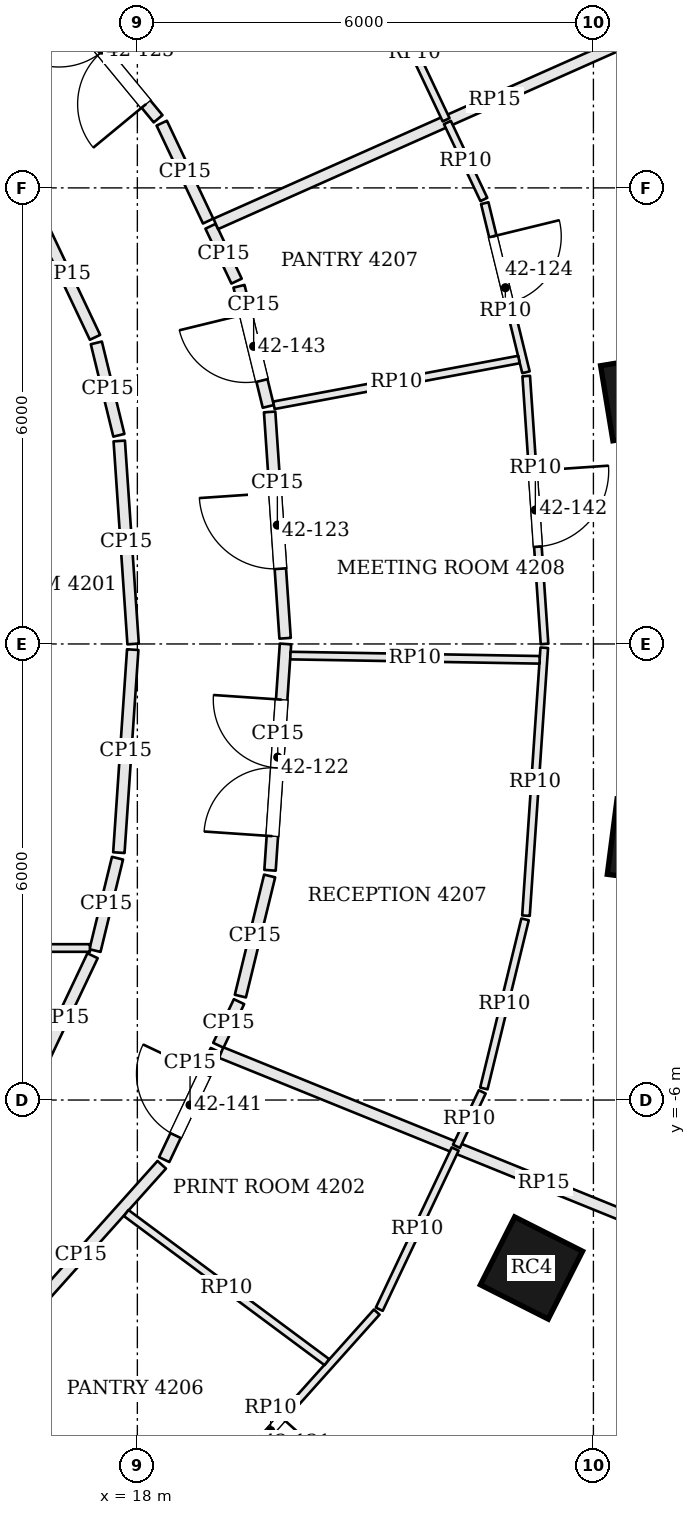
"""IFC4 building model, lengths in metres.
Left out: names, types, materials, properties, quantities, classifications, styles, units other than length and angle.
Written with IfcOpenShell. Run it as: python <this file> out.ifc"""

import sys

from ifc_helpers import new_model, si_unit, direction, frame, frame_2d, origin, origin_2d, place, context, subcontext, project, spatial, rectangle, extrude, element, fill, save


model = new_model("IFC4")
c1 = context("Model", 3, precision=1e-05, world=origin(), true_north=direction((0.0, 1.0)))
c2 = subcontext(c1, "Body", "Model", "MODEL_VIEW")
j1 = project(units=[si_unit("LENGTHUNIT", "METRE"), si_unit("PLANEANGLEUNIT", "RADIAN")], contexts=[c1])
p1 = place(None, origin())
s1 = spatial("IfcSite", under=j1, at=p1, CompositionType="ELEMENT")
p2 = place(p1, origin())
s2 = spatial("IfcBuilding", under=s1, at=p2, CompositionType="ELEMENT")
p3 = place(p2, frame((0.0, 0.0, 174.0)))
s3 = spatial("IfcBuildingStorey", under=s2, at=p3, CompositionType="ELEMENT", Elevation=174.0)
for number, where, z_axis, x_axis in (
    (1, (24.669, 3.248, -0.7), (0.0, 0.0, 1.0), (-0.162, 0.987, 0.0)),
    (2, (23.185, -8.21, -0.7), (0.0, 0.0, 1.0), (0.451, 0.893, 0.0)),
    (3, (24.743, -2.599, -0.7), (0.0, 0.0, 1.0), (0.128, 0.992, 0.0)),
):
    element("IfcColumn", number, at=place(p3, frame(where, z_axis=z_axis, x_axis=x_axis)), inside=s3, PredefinedType="COLUMN", context=c2, shape_type="SweptSolid", body=[
        extrude(rectangle(XDim=1.0, YDim=1.0, at=origin_2d()), origin(), (0.0, 0.0, 1.0), 4.6),
    ])
p4 = place(p3, frame((23.368, -11.701, 0.0), z_axis=(0.0, 0.0, 1.0), x_axis=(0.850251408633, 0.526376806211, 0.0)))
e4 = element("IfcWall", 4, at=p4, inside=s3, PredefinedType="SOLIDWALL", context=c2, shape_type="SweptSolid", body=[
    extrude(rectangle(XDim=5.302, YDim=0.45, at=frame_2d((2.651, 0.0))), origin(), (0.0, 0.0, 1.0), 3.7),
])
p5 = place(p4, frame((1.601, 0.0, 0.9)))
e5 = element("IfcOpeningElement", 5, at=p5, cuts=e4, PredefinedType="OPENING", context=c2, shape_type="SweptSolid", body=[
    extrude(rectangle(XDim=2.1, YDim=2.3, at=frame_2d((1.05, 1.15))), frame((0.0, 0.235, 0.0), z_axis=(0.0, -1.0, 0.0), x_axis=(1.0, 0.0, 0.0)), (0.0, 0.0, 1.0), 0.47),
])
p6 = place(p3, frame((16.193, -9.229, 0.0), z_axis=(0.0, 0.0, 1.0), x_axis=(0.666882089048, 0.745163256815, 0.0)))
e6 = element("IfcWall", 6, at=p6, inside=s3, PredefinedType="PARTITIONING", context=c2, shape_type="SweptSolid", body=[
    extrude(rectangle(XDim=3.19, YDim=0.15, at=frame_2d((1.595, 0.0))), origin(), (0.0, 0.0, 1.0), 3.084),
])
p7 = place(p3, frame((18.353, -6.784, 0.0), z_axis=(0.0, 0.0, 1.0), x_axis=(0.428125964575, 0.90371907054, 0.0)))
e7 = element("IfcWall", 7, at=p7, inside=s3, PredefinedType="PARTITIONING", context=c2, shape_type="SweptSolid", body=[
    extrude(rectangle(XDim=1.589, YDim=0.15, at=frame_2d((0.795, 0.0))), origin(), (0.0, 0.0, 1.0), 3.084),
])
p8 = place(p7, frame((0.35, 0.0, 0.0)))
e8 = element("IfcOpeningElement", 8, at=p8, cuts=e7, PredefinedType="OPENING", context=c2, shape_type="SweptSolid", body=[
    extrude(rectangle(XDim=0.9, YDim=2.1, at=frame_2d((0.45, 1.05))), frame((0.0, 0.085, 0.0), z_axis=(0.0, -1.0, 0.0), x_axis=(1.0, 0.0, 0.0)), (0.0, 0.0, 1.0), 0.17),
])
p9 = place(p3, frame((27.593, -8.816, 0.0), z_axis=(0.0, 0.0, 1.0), x_axis=(-0.9267854071, 0.375591279433, 0.0)))
e9 = element("IfcWall", 9, at=p9, inside=s3, PredefinedType="PARTITIONING", context=c2, shape_type="SweptSolid", body=[
    extrude(rectangle(XDim=9.161, YDim=0.15, at=frame_2d((4.58, 0.0))), origin(), (0.0, 0.0, 1.0), 3.234),
])
p10 = place(p3, frame((19.065, -5.28, 0.0), z_axis=(0.0, 0.0, 1.0), x_axis=(0.428202003813, 0.903683043954, 0.0)))
e10 = element("IfcWall", 10, at=p10, inside=s3, PredefinedType="PARTITIONING", context=c2, shape_type="SweptSolid", body=[
    extrude(rectangle(XDim=0.635, YDim=0.15, at=frame_2d((0.318, 0.0))), origin(), (0.0, 0.0, 1.0), 3.084),
])
p11 = place(p3, frame((19.355, -4.633, 0.0), z_axis=(0.0, 0.0, 1.0), x_axis=(0.236703930685, 0.971581828359, 0.0)))
e11 = element("IfcWall", 11, at=p11, inside=s3, PredefinedType="PARTITIONING", context=c2, shape_type="SweptSolid", body=[
    extrude(rectangle(XDim=1.626, YDim=0.15, at=frame_2d((0.813, 0.0))), origin(), (0.0, 0.0, 1.0), 3.084),
])
p12 = place(p3, frame((19.745, -2.978, 0.0), z_axis=(0.0, 0.0, 1.0), x_axis=(0.068142324, 0.997675610447, 0.0)))
e12 = element("IfcWall", 12, at=p12, inside=s3, PredefinedType="PARTITIONING", context=c2, shape_type="SweptSolid", body=[
    extrude(rectangle(XDim=2.984, YDim=0.15, at=frame_2d((1.492, 0.0))), origin(), (0.0, 0.0, 1.0), 3.084),
])
p13 = place(p12, frame((0.45, 0.0, 0.0)))
e13 = element("IfcOpeningElement", 13, at=p13, cuts=e12, PredefinedType="OPENING", context=c2, shape_type="SweptSolid", body=[
    extrude(rectangle(XDim=1.8, YDim=2.1, at=frame_2d((0.9, 1.05))), frame((0.0, 0.085, 0.0), z_axis=(0.0, -1.0, 0.0), x_axis=(1.0, 0.0, 0.0)), (0.0, 0.0, 1.0), 0.17),
])
p14 = place(p3, frame((19.944, 0.075, 0.0), z_axis=(0.0, 0.0, 1.0), x_axis=(-0.068136763128, 0.997675990245, 0.0)))
e14 = element("IfcWall", 14, at=p14, inside=s3, PredefinedType="PARTITIONING", context=c2, shape_type="SweptSolid", body=[
    extrude(rectangle(XDim=2.985, YDim=0.15, at=frame_2d((1.492, 0.0))), origin(), (0.0, 0.0, 1.0), 3.084),
])
p15 = place(p14, frame((0.917, 0.0, 0.0)))
e15 = element("IfcOpeningElement", 15, at=p15, cuts=e14, PredefinedType="OPENING", context=c2, shape_type="SweptSolid", body=[
    extrude(rectangle(XDim=1.0, YDim=2.4, at=frame_2d((0.5, 1.2))), frame((0.0, 0.085, 0.0), z_axis=(0.0, -1.0, 0.0), x_axis=(1.0, 0.0, 0.0)), (0.0, 0.0, 1.0), 0.17),
])
p16 = place(p3, frame((19.722, 3.125, 0.0), z_axis=(0.0, 0.0, 1.0), x_axis=(-0.236703930685, 0.971581828359, 0.0)))
e16 = element("IfcWall", 16, at=p16, inside=s3, PredefinedType="PARTITIONING", context=c2, shape_type="SweptSolid", body=[
    extrude(rectangle(XDim=1.626, YDim=0.15, at=frame_2d((0.813, 0.0))), origin(), (0.0, 0.0, 1.0), 3.084),
])
p17 = place(p16, frame((0.35, 0.0, 0.0)))
e17 = element("IfcOpeningElement", 17, at=p17, cuts=e16, PredefinedType="OPENING", context=c2, shape_type="SweptSolid", body=[
    extrude(rectangle(XDim=0.9, YDim=2.1, at=frame_2d((0.45, 1.05))), frame((0.0, 0.085, 0.0), z_axis=(0.0, -1.0, 0.0), x_axis=(1.0, 0.0, 0.0)), (0.0, 0.0, 1.0), 0.17),
])
p18 = place(p3, frame((19.305, 4.773, 0.0), z_axis=(0.0, 0.0, 1.0), x_axis=(-0.428296443676, 0.90363828844, 0.0)))
e18 = element("IfcWall", 18, at=p18, inside=s3, PredefinedType="PARTITIONING", context=c2, shape_type="SweptSolid", body=[
    extrude(rectangle(XDim=0.799, YDim=0.15, at=frame_2d((0.399, 0.0))), origin(), (0.0, 0.0, 1.0), 3.084),
])
p19 = place(p3, frame((26.367, 8.789, 0.0), z_axis=(0.0, 0.0, 1.0), x_axis=(-0.913673557468, -0.406448804137, 0.0)))
e19 = element("IfcWall", 19, at=p19, inside=s3, PredefinedType="PARTITIONING", context=c2, shape_type="SweptSolid", body=[
    extrude(rectangle(XDim=8.029, YDim=0.15, at=frame_2d((4.014, 0.0))), origin(), (0.0, 0.0, 1.0), 3.234),
])
p20 = place(p3, frame((18.931, 5.563, 0.0), z_axis=(0.0, 0.0, 1.0), x_axis=(-0.428204145682, 0.903682029046, 0.0)))
e20 = element("IfcWall", 20, at=p20, inside=s3, PredefinedType="PARTITIONING", context=c2, shape_type="SweptSolid", body=[
    extrude(rectangle(XDim=1.425, YDim=0.15, at=frame_2d((0.713, 0.0))), origin(), (0.0, 0.0, 1.0), 3.084),
])
p21 = place(p3, frame((18.273, 6.909, 0.0), z_axis=(0.0, 0.0, 1.0), x_axis=(-0.63653648943, 0.771246586783, 0.0)))
e21 = element("IfcWall", 21, at=p21, inside=s3, PredefinedType="PARTITIONING", context=c2, shape_type="SweptSolid", body=[
    extrude(rectangle(XDim=2.342, YDim=0.15, at=frame_2d((1.171, 0.0))), origin(), (0.0, 0.0, 1.0), 3.084),
])
p22 = place(p21, frame((0.25, 0.0, 0.0)))
e22 = element("IfcOpeningElement", 22, at=p22, cuts=e21, PredefinedType="OPENING", context=c2, shape_type="SweptSolid", body=[
    extrude(rectangle(XDim=1.8, YDim=2.1, at=frame_2d((0.9, 1.05))), frame((0.0, 0.085, 0.0), z_axis=(0.0, -1.0, 0.0), x_axis=(1.0, 0.0, 0.0)), (0.0, 0.0, 1.0), 0.17),
])
p23 = place(p3, frame((16.652, 5.702, 0.0), z_axis=(0.0, 0.0, 1.0), x_axis=(0.428126129773, -0.903718992279, 0.0)))
e23 = element("IfcWall", 23, at=p23, inside=s3, PredefinedType="PARTITIONING", context=c2, shape_type="SweptSolid", body=[
    extrude(rectangle(XDim=1.846, YDim=0.15, at=frame_2d((0.923, 0.0))), origin(), (0.0, 0.0, 1.0), 3.084),
])
p24 = place(p3, frame((17.46, 3.961, 0.0), z_axis=(0.0, 0.0, 1.0), x_axis=(0.236655249498, -0.971593687137, 0.0)))
e24 = element("IfcWall", 24, at=p24, inside=s3, PredefinedType="PARTITIONING", context=c2, shape_type="SweptSolid", body=[
    extrude(rectangle(XDim=1.251, YDim=0.15, at=frame_2d((0.626, 0.0))), origin(), (0.0, 0.0, 1.0), 3.084),
])
p25 = place(p3, frame((17.762, 2.67, 0.0), z_axis=(0.0, 0.0, 1.0), x_axis=(0.068135311644, -0.997676089373, 0.0)))
e25 = element("IfcWall", 25, at=p25, inside=s3, PredefinedType="PARTITIONING", context=c2, shape_type="SweptSolid", body=[
    extrude(rectangle(XDim=2.677, YDim=0.15, at=frame_2d((1.338, 0.0))), origin(), (0.0, 0.0, 1.0), 3.084),
])
p26 = place(p3, frame((17.939, -0.075, 0.0), z_axis=(0.0, 0.0, 1.0), x_axis=(-0.068226099283, -0.99766988497, 0.0)))
e26 = element("IfcWall", 26, at=p26, inside=s3, PredefinedType="PARTITIONING", context=c2, shape_type="SweptSolid", body=[
    extrude(rectangle(XDim=2.677, YDim=0.15, at=frame_2d((1.338, 0.0))), origin(), (0.0, 0.0, 1.0), 3.084),
])
p27 = place(p3, frame((17.739, -2.818, 0.0), z_axis=(0.0, 0.0, 1.0), x_axis=(-0.236884307907, -0.971537865792, 0.0)))
e27 = element("IfcWall", 27, at=p27, inside=s3, PredefinedType="PARTITIONING", context=c2, shape_type="SweptSolid", body=[
    extrude(rectangle(XDim=1.251, YDim=0.15, at=frame_2d((0.625, 0.0))), origin(), (0.0, 0.0, 1.0), 3.084),
])
p28 = place(p3, frame((17.41, -4.102, 0.0), z_axis=(0.0, 0.0, 1.0), x_axis=(-0.428074720318, -0.903743345107, 0.0)))
e28 = element("IfcWall", 28, at=p28, inside=s3, PredefinedType="PARTITIONING", context=c2, shape_type="SweptSolid", body=[
    extrude(rectangle(XDim=1.806, YDim=0.15, at=frame_2d((0.903, 0.0))), origin(), (0.0, 0.0, 1.0), 3.084),
])
p29 = place(p3, frame((22.181, -6.645, 0.0), z_axis=(0.0, 0.0, 1.0), x_axis=(-0.428144841987, -0.903710127353, 0.0)))
e29 = element("IfcWall", 29, at=p29, inside=s3, PredefinedType="PARTITIONING", context=c2, shape_type="SweptSolid", body=[
    extrude(rectangle(XDim=2.332, YDim=0.1, at=frame_2d((1.166, 0.0))), origin(), (0.0, 0.0, 1.0), 3.084),
])
p30 = place(p3, frame((21.149, -8.789, 0.0), z_axis=(0.0, 0.0, 1.0), x_axis=(-0.666915902537, -0.745132994132, 0.0)))
e30 = element("IfcWall", 30, at=p30, inside=s3, PredefinedType="PARTITIONING", context=c2, shape_type="SweptSolid", body=[
    extrude(rectangle(XDim=4.186, YDim=0.1, at=frame_2d((2.093, 0.0))), origin(), (0.0, 0.0, 1.0), 3.084),
])
p31 = place(p30, frame((1.869, 0.0, 0.0)))
e31 = element("IfcOpeningElement", 31, at=p31, cuts=e30, PredefinedType="OPENING", context=c2, shape_type="SweptSolid", body=[
    extrude(rectangle(XDim=0.9, YDim=2.1, at=frame_2d((0.45, 1.05))), frame((0.0, 0.06, 0.0), z_axis=(0.0, -1.0, 0.0), x_axis=(1.0, 0.0, 0.0)), (0.0, 0.0, 1.0), 0.12),
])
p32 = place(p3, frame((17.853, -7.487, 0.0), z_axis=(0.0, 0.0, 1.0), x_axis=(0.802681916891, -0.596407361034, 0.0)))
e32 = element("IfcWall", 32, at=p32, inside=s3, PredefinedType="PARTITIONING", context=c2, shape_type="SweptSolid", body=[
    extrude(rectangle(XDim=3.289, YDim=0.1, at=frame_2d((1.645, 0.0))), origin(), (0.0, 0.0, 1.0), 3.084),
])
p33 = place(p3, frame((22.079, 6.86, 0.0), z_axis=(0.0, 0.0, 1.0), x_axis=(0.428105084675, -0.903728961844, 0.0)))
e33 = element("IfcWall", 33, at=p33, inside=s3, PredefinedType="PARTITIONING", context=c2, shape_type="SweptSolid", body=[
    extrude(rectangle(XDim=1.12, YDim=0.1, at=frame_2d((0.56, 0.0))), origin(), (0.0, 0.0, 1.0), 3.084),
])
p34 = place(p3, frame((22.57, 5.799, 0.0), z_axis=(0.0, 0.0, 1.0), x_axis=(0.236811358433, -0.971555649727, 0.0)))
e34 = element("IfcWall", 34, at=p34, inside=s3, PredefinedType="PARTITIONING", context=c2, shape_type="SweptSolid", body=[
    extrude(rectangle(XDim=2.29, YDim=0.1, at=frame_2d((1.145, 0.0))), origin(), (0.0, 0.0, 1.0), 3.084),
])
p35 = place(p34, frame((0.45, 0.0, 0.0)))
e35 = element("IfcOpeningElement", 35, at=p35, cuts=e34, PredefinedType="OPENING", context=c2, shape_type="SweptSolid", body=[
    extrude(rectangle(XDim=0.9, YDim=2.1, at=frame_2d((0.45, 1.05))), frame((0.0, 0.06, 0.0), z_axis=(0.0, -1.0, 0.0), x_axis=(1.0, 0.0, 0.0)), (0.0, 0.0, 1.0), 0.12),
])
p36 = place(p3, frame((23.116, 3.525, 0.0), z_axis=(0.0, 0.0, 1.0), x_axis=(0.068138009452, -0.997675905125, 0.0)))
e36 = element("IfcWall", 36, at=p36, inside=s3, PredefinedType="PARTITIONING", context=c2, shape_type="SweptSolid", body=[
    extrude(rectangle(XDim=3.533, YDim=0.1, at=frame_2d((1.767, 0.0))), origin(), (0.0, 0.0, 1.0), 3.084),
])
p37 = place(p36, frame((1.25, 0.0, 0.0)))
e37 = element("IfcOpeningElement", 37, at=p37, cuts=e36, PredefinedType="OPENING", context=c2, shape_type="SweptSolid", body=[
    extrude(rectangle(XDim=1.0, YDim=2.4, at=frame_2d((0.5, 1.2))), frame((0.0, 0.06, 0.0), z_axis=(0.0, -1.0, 0.0), x_axis=(1.0, 0.0, 0.0)), (0.0, 0.0, 1.0), 0.12),
])
p38 = place(p3, frame((23.354, -0.05, 0.0), z_axis=(0.0, 0.0, 1.0), x_axis=(-0.06820679361, -0.99767120501, 0.0)))
e38 = element("IfcWall", 38, at=p38, inside=s3, PredefinedType="PARTITIONING", context=c2, shape_type="SweptSolid", body=[
    extrude(rectangle(XDim=3.533, YDim=0.1, at=frame_2d((1.767, 0.0))), origin(), (0.0, 0.0, 1.0), 3.084),
])
p39 = place(p3, frame((23.101, -3.623, 0.0), z_axis=(0.0, 0.0, 1.0), x_axis=(-0.236811358433, -0.971555649727, 0.0)))
e39 = element("IfcWall", 39, at=p39, inside=s3, PredefinedType="PARTITIONING", context=c2, shape_type="SweptSolid", body=[
    extrude(rectangle(XDim=2.29, YDim=0.1, at=frame_2d((1.145, 0.0))), origin(), (0.0, 0.0, 1.0), 3.084),
])
p40 = place(p3, frame((22.537, -5.893, 0.0), z_axis=(0.0, 0.0, 1.0), x_axis=(-0.427993557618, -0.903781784856, 0.0)))
e40 = element("IfcWall", 40, at=p40, inside=s3, PredefinedType="PARTITIONING", context=c2, shape_type="SweptSolid", body=[
    extrude(rectangle(XDim=0.792, YDim=0.1, at=frame_2d((0.396, 0.0))), origin(), (0.0, 0.0, 1.0), 3.084),
])
p41 = place(p3, frame((20.013, -0.153, 0.0), z_axis=(0.0, 0.0, 1.0), x_axis=(0.999854678593, -0.017047630214, 0.0)))
e41 = element("IfcWall", 41, at=p41, inside=s3, PredefinedType="PARTITIONING", context=c2, shape_type="SweptSolid", body=[
    extrude(rectangle(XDim=3.28, YDim=0.1, at=frame_2d((1.64, 0.0))), origin(), (0.0, 0.0, 1.0), 3.084),
])
p42 = place(p3, frame((19.796, 3.14, 0.0), z_axis=(0.0, 0.0, 1.0), x_axis=(0.983010938824, 0.183546980778, 0.0)))
e42 = element("IfcWall", 42, at=p42, inside=s3, PredefinedType="PARTITIONING", context=c2, shape_type="SweptSolid", body=[
    extrude(rectangle(XDim=3.28, YDim=0.1, at=frame_2d((1.64, 0.0))), origin(), (0.0, 0.0, 1.0), 3.084),
])
p43 = place(p3, frame((21.234, 8.644, 0.0), z_axis=(0.0, 0.0, 1.0), x_axis=(0.428183987328, -0.903691580682, 0.0)))
e43 = element("IfcWall", 43, at=p43, inside=s3, PredefinedType="PARTITIONING", context=c2, shape_type="SweptSolid", body=[
    extrude(rectangle(XDim=1.935, YDim=0.1, at=frame_2d((0.967, 0.0))), origin(), (0.0, 0.0, 1.0), 3.084),
])
p44 = place(p3, frame((15.075, -4.0, 0.0), z_axis=(0.0, 0.0, 1.0), x_axis=(1.0, 0.0, 0.0)))
e44 = element("IfcWall", 44, at=p44, inside=s3, PredefinedType="PARTITIONING", context=c2, shape_type="SweptSolid", body=[
    extrude(rectangle(XDim=2.301, YDim=0.1, at=frame_2d((1.15, 0.0))), origin(), (0.0, 0.0, 1.0), 3.084),
])
p45 = place(p31, origin())
e45 = element("IfcDoor", 45, at=p45, inside=s3, OperationType="SINGLE_SWING_LEFT", PredefinedType="DOOR", context=c2, shape_type="SweptSolid", body=[
    extrude(rectangle(XDim=0.9, YDim=2.1, at=frame_2d((0.45, 1.05))), frame((0.0, 0.025, 0.0), z_axis=(0.0, -1.0, 0.0), x_axis=(1.0, 0.0, 0.0)), (0.0, 0.0, 1.0), 0.05),
])
fill(e31, e45)
p46 = place(p13, origin())
e46 = element("IfcDoor", 46, at=p46, inside=s3, OperationType="DOUBLE_DOOR_SINGLE_SWING", PredefinedType="DOOR", context=c2, shape_type="SweptSolid", body=[
    extrude(rectangle(XDim=1.8, YDim=2.1, at=frame_2d((0.9, 1.05))), frame((0.0, 0.025, 0.0), z_axis=(0.0, -1.0, 0.0), x_axis=(1.0, 0.0, 0.0)), (0.0, 0.0, 1.0), 0.05),
])
fill(e13, e46)
p47 = place(p15, origin())
e47 = element("IfcDoor", 47, at=p47, inside=s3, OperationType="SINGLE_SWING_RIGHT", PredefinedType="DOOR", context=c2, shape_type="SweptSolid", body=[
    extrude(rectangle(XDim=1.0, YDim=2.4, at=frame_2d((0.5, 1.2))), frame((0.0, 0.025, 0.0), z_axis=(0.0, -1.0, 0.0), x_axis=(1.0, 0.0, 0.0)), (0.0, 0.0, 1.0), 0.05),
])
fill(e15, e47)
p48 = place(p35, origin())
e48 = element("IfcDoor", 48, at=p48, inside=s3, OperationType="SINGLE_SWING_LEFT", PredefinedType="DOOR", context=c2, shape_type="SweptSolid", body=[
    extrude(rectangle(XDim=0.9, YDim=2.1, at=frame_2d((0.45, 1.05))), frame((0.0, 0.025, 0.0), z_axis=(0.0, -1.0, 0.0), x_axis=(1.0, 0.0, 0.0)), (0.0, 0.0, 1.0), 0.05),
])
fill(e35, e48)
p49 = place(p22, origin())
e49 = element("IfcDoor", 49, at=p49, inside=s3, OperationType="DOUBLE_DOOR_SINGLE_SWING", PredefinedType="DOOR", context=c2, shape_type="SweptSolid", body=[
    extrude(rectangle(XDim=1.8, YDim=2.1, at=frame_2d((0.9, 1.05))), frame((0.0, 0.025, 0.0), z_axis=(0.0, -1.0, 0.0), x_axis=(1.0, 0.0, 0.0)), (0.0, 0.0, 1.0), 0.05),
])
fill(e22, e49)
p50 = place(p8, origin())
e50 = element("IfcDoor", 50, at=p50, inside=s3, OperationType="SINGLE_SWING_RIGHT", PredefinedType="DOOR", context=c2, shape_type="SweptSolid", body=[
    extrude(rectangle(XDim=0.9, YDim=2.1, at=frame_2d((0.45, 1.05))), frame((0.0, 0.025, 0.0), z_axis=(0.0, -1.0, 0.0), x_axis=(1.0, 0.0, 0.0)), (0.0, 0.0, 1.0), 0.05),
])
fill(e8, e50)
p51 = place(p37, origin())
e51 = element("IfcDoor", 51, at=p51, inside=s3, OperationType="SINGLE_SWING_LEFT", PredefinedType="DOOR", context=c2, shape_type="SweptSolid", body=[
    extrude(rectangle(XDim=1.0, YDim=2.4, at=frame_2d((0.5, 1.2))), frame((0.0, 0.025, 0.0), z_axis=(0.0, -1.0, 0.0), x_axis=(1.0, 0.0, 0.0)), (0.0, 0.0, 1.0), 0.05),
])
fill(e37, e51)
p52 = place(p17, origin())
e52 = element("IfcDoor", 52, at=p52, inside=s3, OperationType="SINGLE_SWING_RIGHT", PredefinedType="DOOR", context=c2, shape_type="SweptSolid", body=[
    extrude(rectangle(XDim=0.9, YDim=2.1, at=frame_2d((0.45, 1.05))), frame((0.0, 0.025, 0.0), z_axis=(0.0, -1.0, 0.0), x_axis=(1.0, 0.0, 0.0)), (0.0, 0.0, 1.0), 0.05),
])
fill(e17, e52)
save(model, sys.argv[1])
